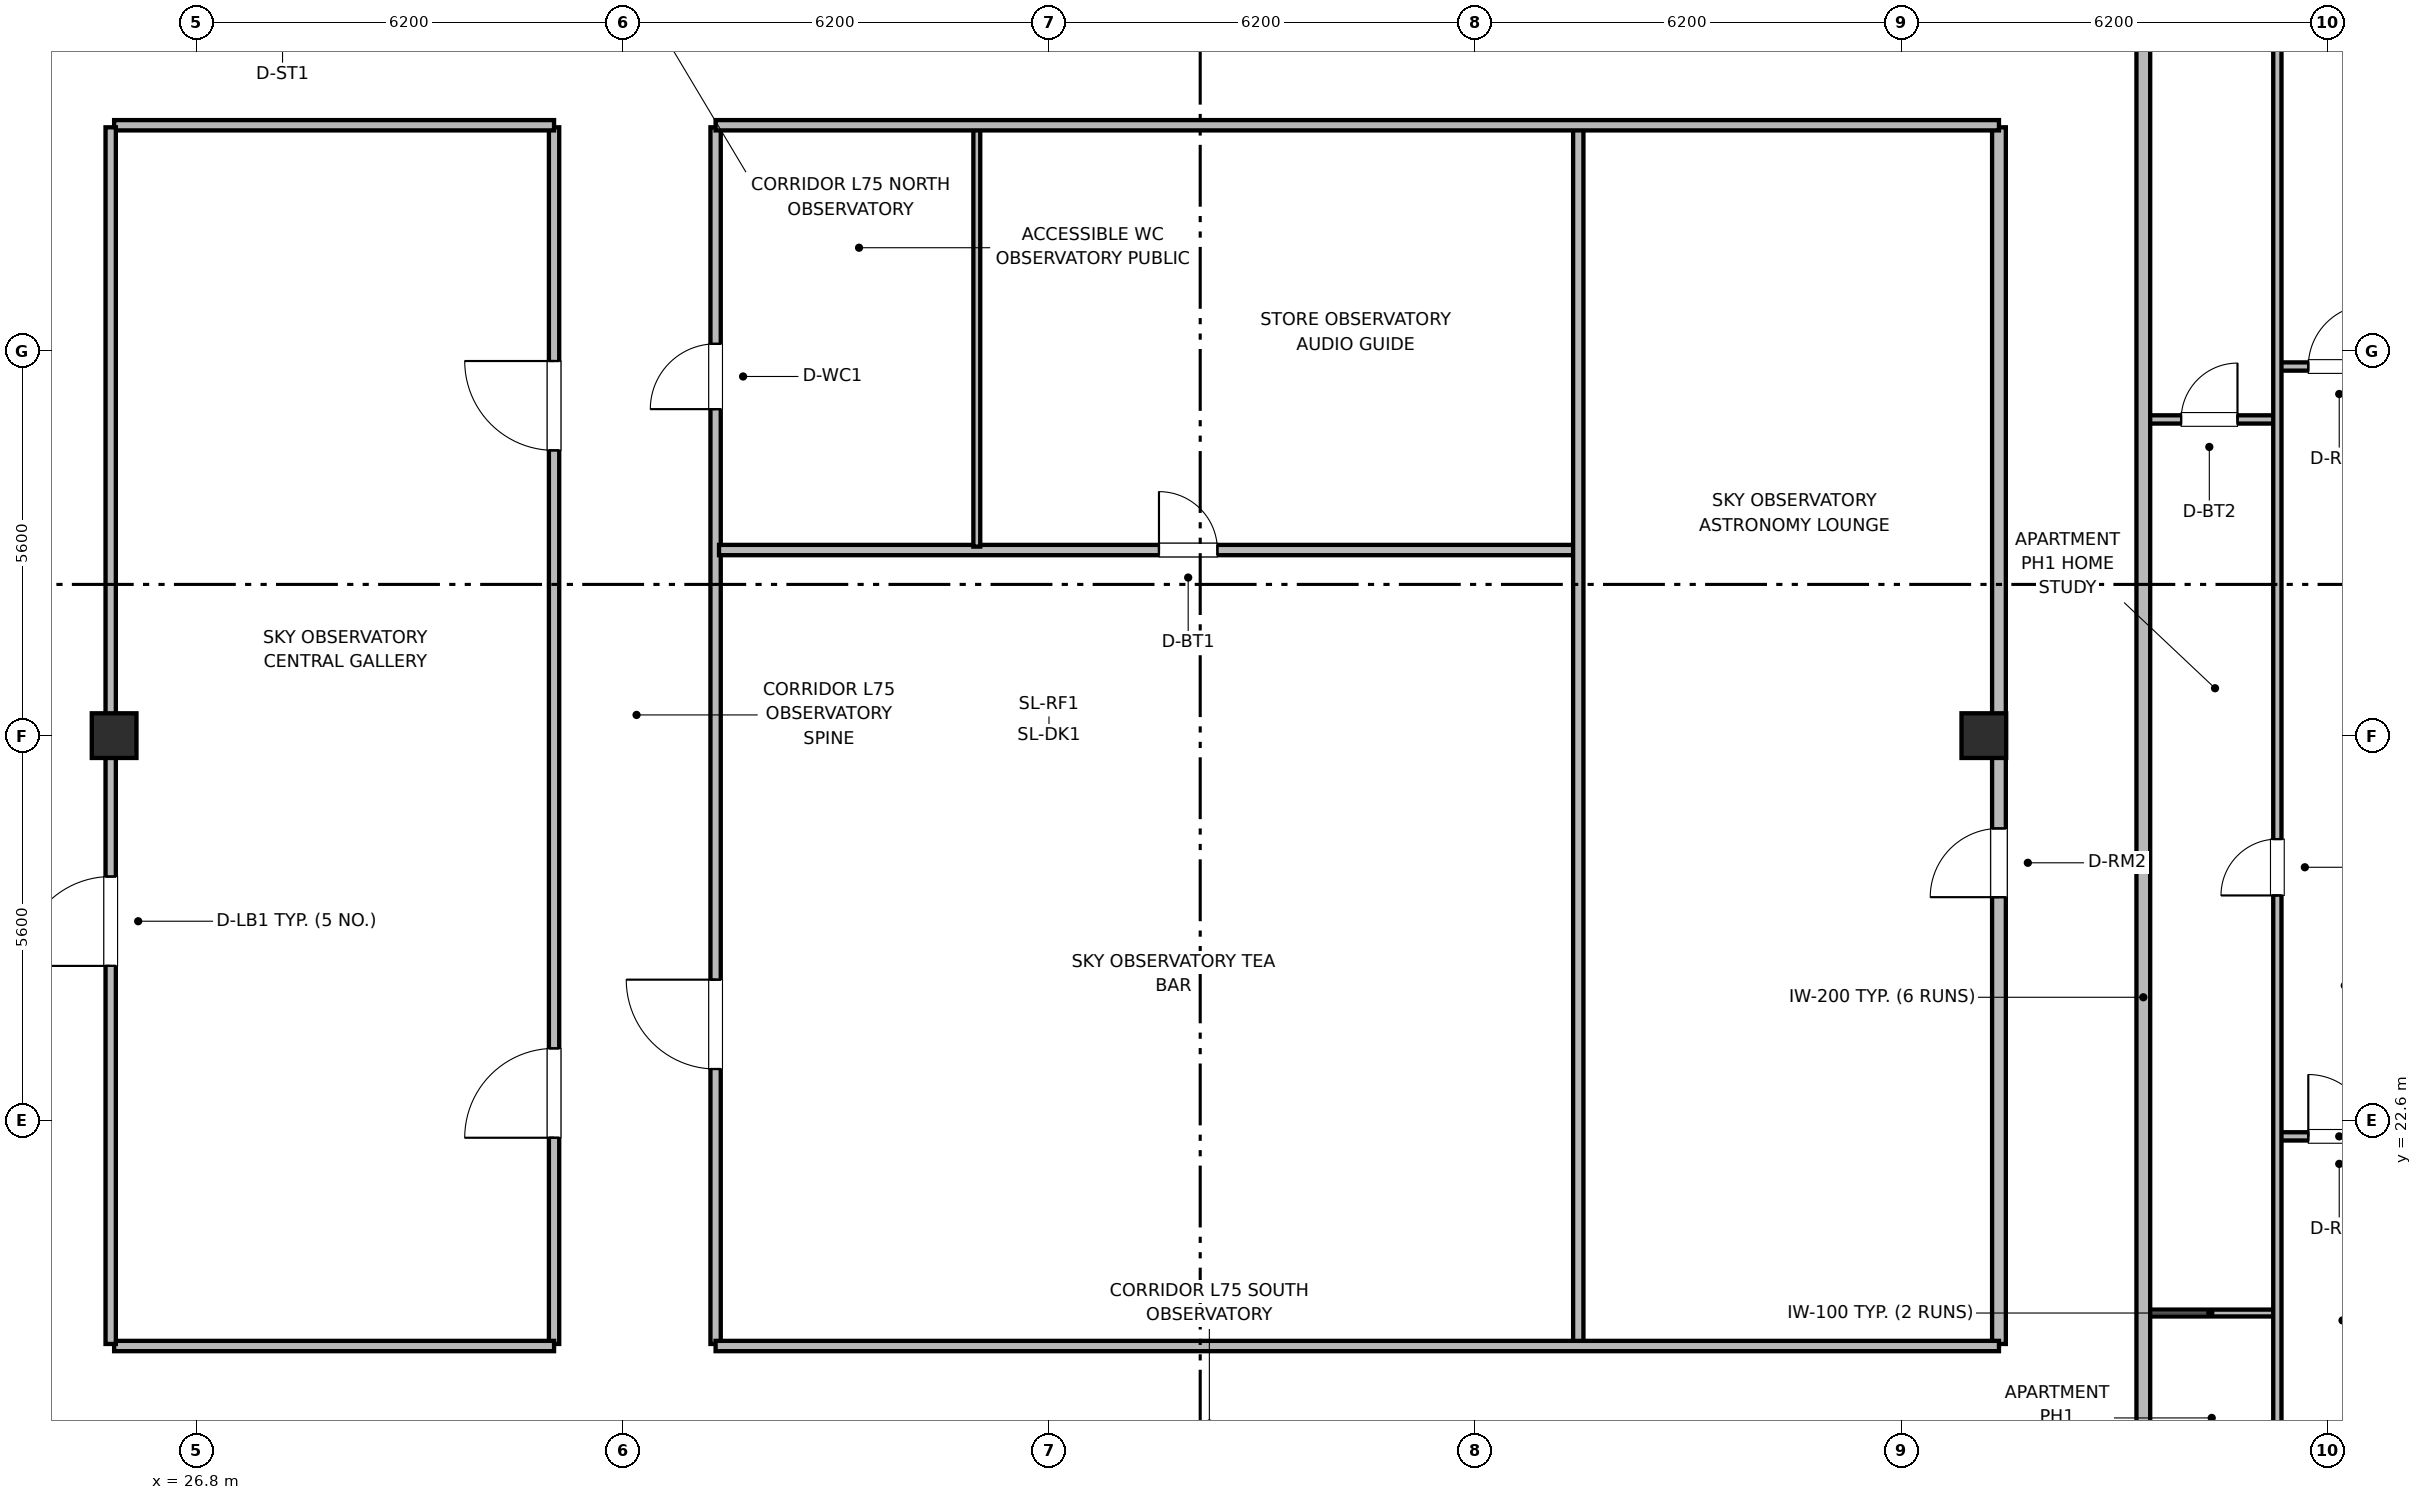
"""IFC4 building model, lengths in metres.
Left out: names, types, materials, properties, quantities, classifications, styles, units other than length and angle.
Written with IfcOpenShell. Run it as: python <this file> out.ifc"""

import sys

from ifc_helpers import new_model, si_unit, direction, frame, frame_2d, origin, origin_2d, place, context, subcontext, project, spatial, rectangle, extrude, element, fill, save


model = new_model("IFC4")
c1 = context("Model", 3, precision=1e-05, world=origin(), true_north=direction((0.0, 1.0)))
c2 = subcontext(c1, "Body", "Model", "MODEL_VIEW")
j1 = project(units=[si_unit("LENGTHUNIT", "METRE"), si_unit("PLANEANGLEUNIT", "RADIAN")], contexts=[c1])
p1 = place(None, origin())
s1 = spatial("IfcSite", under=j1, at=p1, CompositionType="ELEMENT")
p2 = place(p1, origin())
s2 = spatial("IfcBuilding", under=s1, at=p2, CompositionType="ELEMENT")
p3 = place(p2, frame((0.0, 0.0, 297.2)))
s3 = spatial("IfcBuildingStorey", under=s2, at=p3, CompositionType="ELEMENT", Elevation=297.2)
for number, where, z_axis, x_axis in (
    (1, (25.6, 28.2, 0.0), (0.0, 0.0, 1.0), (1.0, 0.0, 0.0)),
    (2, (52.8, 28.2, 0.0), (0.0, 0.0, 1.0), (1.0, 0.0, 0.0)),
):
    element("IfcColumn", number, at=place(p3, frame(where, z_axis=z_axis, x_axis=x_axis)), inside=s3, PredefinedType="COLUMN", context=c2, shape_type="SweptSolid", body=[
        extrude(rectangle(XDim=0.65, YDim=0.65, at=origin_2d()), origin(), (0.0, 0.0, 1.0), 4.8),
    ])
p4 = place(p3, frame((32.0, 19.35, 0.0), z_axis=(0.0, 0.0, 1.0), x_axis=(0.0, 1.0, 0.0)))
e3 = element("IfcWall", 3, at=p4, inside=s3, PredefinedType="PARTITIONING", context=c2, shape_type="SweptSolid", body=[
    extrude(rectangle(XDim=17.7, YDim=0.15, at=frame_2d((8.85, 0.0))), origin(), (0.0, 0.0, 1.0), 2.56),
])
p5 = place(p4, frame((3.0, 0.0, 0.0)))
e4 = element("IfcOpeningElement", 4, at=p5, cuts=e3, PredefinedType="OPENING", context=c2, shape_type="SweptSolid", body=[
    extrude(rectangle(XDim=1.3, YDim=2.2, at=frame_2d((0.65, 1.1))), frame((0.0, 0.085, 0.0), z_axis=(0.0, -1.0, 0.0), x_axis=(1.0, 0.0, 0.0)), (0.0, 0.0, 1.0), 0.17),
])
p6 = place(p4, frame((13.0, 0.0, 0.0)))
e5 = element("IfcOpeningElement", 5, at=p6, cuts=e3, PredefinedType="OPENING", context=c2, shape_type="SweptSolid", body=[
    extrude(rectangle(XDim=1.3, YDim=2.2, at=frame_2d((0.65, 1.1))), frame((0.0, 0.085, 0.0), z_axis=(0.0, -1.0, 0.0), x_axis=(1.0, 0.0, 0.0)), (0.0, 0.0, 1.0), 0.17),
])
for number, where, z_axis, x_axis in (
    (6, (25.6, 19.32, 0.0), (0.0, 0.0, 1.0), (1.0, 0.0, 0.0)),
    (7, (25.6, 37.08, 0.0), (0.0, 0.0, 1.0), (1.0, 0.0, 0.0)),
):
    element("IfcWall", number, at=place(p3, frame(where, z_axis=z_axis, x_axis=x_axis)), inside=s3, PredefinedType="PARTITIONING", context=c2, shape_type="SweptSolid", body=[
        extrude(rectangle(XDim=6.4, YDim=0.15, at=frame_2d((3.2, 0.0))), origin(), (0.0, 0.0, 1.0), 2.56),
    ])
p7 = place(p3, frame((25.55, 19.35, 0.0), z_axis=(0.0, 0.0, 1.0), x_axis=(0.0, 1.0, 0.0)))
e8 = element("IfcWall", 8, at=p7, inside=s3, PredefinedType="PARTITIONING", context=c2, shape_type="SweptSolid", body=[
    extrude(rectangle(XDim=17.7, YDim=0.15, at=frame_2d((8.85, 0.0))), origin(), (0.0, 0.0, 1.0), 2.56),
])
p8 = place(p7, frame((5.5, 0.0, 0.0)))
e9 = element("IfcOpeningElement", 9, at=p8, cuts=e8, PredefinedType="OPENING", context=c2, shape_type="SweptSolid", body=[
    extrude(rectangle(XDim=1.3, YDim=2.2, at=frame_2d((0.65, 1.1))), frame((0.0, 0.085, 0.0), z_axis=(0.0, -1.0, 0.0), x_axis=(1.0, 0.0, 0.0)), (0.0, 0.0, 1.0), 0.17),
])
p9 = place(p3, frame((34.35, 19.35, 0.0), z_axis=(0.0, 0.0, 1.0), x_axis=(0.0, 1.0, 0.0)))
e10 = element("IfcWall", 10, at=p9, inside=s3, PredefinedType="PARTITIONING", context=c2, shape_type="SweptSolid", body=[
    extrude(rectangle(XDim=17.7, YDim=0.15, at=frame_2d((8.85, 0.0))), origin(), (0.0, 0.0, 1.0), 2.56),
])
p10 = place(p9, frame((4.0, 0.0, 0.0)))
e11 = element("IfcOpeningElement", 11, at=p10, cuts=e10, PredefinedType="OPENING", context=c2, shape_type="SweptSolid", body=[
    extrude(rectangle(XDim=1.3, YDim=2.2, at=frame_2d((0.65, 1.1))), frame((0.0, 0.085, 0.0), z_axis=(0.0, -1.0, 0.0), x_axis=(1.0, 0.0, 0.0)), (0.0, 0.0, 1.0), 0.17),
])
p11 = place(p9, frame((13.6, 0.0, 0.0)))
e12 = element("IfcOpeningElement", 12, at=p11, cuts=e10, PredefinedType="OPENING", context=c2, shape_type="SweptSolid", body=[
    extrude(rectangle(XDim=0.95, YDim=2.1, at=frame_2d((0.475, 1.05))), frame((0.0, 0.085, 0.0), z_axis=(0.0, -1.0, 0.0), x_axis=(1.0, 0.0, 0.0)), (0.0, 0.0, 1.0), 0.17),
])
p12 = place(p3, frame((34.4, 30.9, 0.0), z_axis=(0.0, 0.0, 1.0), x_axis=(1.0, 0.0, 0.0)))
e13 = element("IfcWall", 13, at=p12, inside=s3, PredefinedType="PARTITIONING", context=c2, shape_type="SweptSolid", body=[
    extrude(rectangle(XDim=12.45, YDim=0.15, at=frame_2d((6.225, 0.0))), origin(), (0.0, 0.0, 1.0), 2.56),
])
p13 = place(p12, frame((6.4, 0.0, 0.0)))
e14 = element("IfcOpeningElement", 14, at=p13, cuts=e13, PredefinedType="OPENING", context=c2, shape_type="SweptSolid", body=[
    extrude(rectangle(XDim=0.85, YDim=2.1, at=frame_2d((0.425, 1.05))), frame((0.0, 0.085, 0.0), z_axis=(0.0, -1.0, 0.0), x_axis=(1.0, 0.0, 0.0)), (0.0, 0.0, 1.0), 0.17),
])
p14 = place(p3, frame((38.15, 30.95, 0.0), z_axis=(0.0, 0.0, 1.0), x_axis=(0.0, 1.0, 0.0)))
e15 = element("IfcWall", 15, at=p14, inside=s3, PredefinedType="PARTITIONING", context=c2, shape_type="SweptSolid", body=[
    extrude(rectangle(XDim=6.07, YDim=0.1, at=frame_2d((3.035, 0.0))), origin(), (0.0, 0.0, 1.0), 2.56),
])
p15 = place(p3, frame((46.9, 19.35, 0.0), z_axis=(0.0, 0.0, 1.0), x_axis=(0.0, 1.0, 0.0)))
e16 = element("IfcWall", 16, at=p15, inside=s3, PredefinedType="PARTITIONING", context=c2, shape_type="SweptSolid", body=[
    extrude(rectangle(XDim=17.7, YDim=0.15, at=frame_2d((8.85, 0.0))), origin(), (0.0, 0.0, 1.0), 2.56),
])
p16 = place(p3, frame((53.02, 19.35, 0.0), z_axis=(0.0, 0.0, 1.0), x_axis=(0.0, 1.0, 0.0)))
e17 = element("IfcWall", 17, at=p16, inside=s3, PredefinedType="PARTITIONING", context=c2, shape_type="SweptSolid", body=[
    extrude(rectangle(XDim=17.7, YDim=0.2, at=frame_2d((8.85, 0.0))), origin(), (0.0, 0.0, 1.0), 2.56),
])
p17 = place(p16, frame((6.5, 0.0, 0.0)))
e18 = element("IfcOpeningElement", 18, at=p17, cuts=e17, PredefinedType="OPENING", context=c2, shape_type="SweptSolid", body=[
    extrude(rectangle(XDim=1.0, YDim=2.15, at=frame_2d((0.5, 1.075))), frame((0.0, 0.11, 0.0), z_axis=(0.0, -1.0, 0.0), x_axis=(1.0, 0.0, 0.0)), (0.0, 0.0, 1.0), 0.22),
])
for number, where, z_axis, x_axis in (
    (19, (34.35, 19.32, 0.0), (0.0, 0.0, 1.0), (1.0, 0.0, 0.0)),
    (20, (34.35, 37.08, 0.0), (0.0, 0.0, 1.0), (1.0, 0.0, 0.0)),
):
    element("IfcWall", number, at=place(p3, frame(where, z_axis=z_axis, x_axis=x_axis)), inside=s3, PredefinedType="PARTITIONING", context=c2, shape_type="SweptSolid", body=[
        extrude(rectangle(XDim=18.67, YDim=0.15, at=frame_2d((9.335, 0.0))), origin(), (0.0, 0.0, 1.0), 2.56),
    ])
p18 = place(p3, frame((55.12, 19.8, 0.0), z_axis=(0.0, 0.0, 1.0), x_axis=(1.0, 0.0, 0.0)))
e21 = element("IfcWall", 21, at=p18, inside=s3, PredefinedType="PARTITIONING", context=c2, shape_type="SweptSolid", body=[
    extrude(rectangle(XDim=1.95, YDim=0.1, at=frame_2d((0.975, 0.0))), origin(), (0.0, 0.0, 1.0), 2.56),
])
p19 = place(p3, frame((55.12, 32.8, 0.0), z_axis=(0.0, 0.0, 1.0), x_axis=(1.0, 0.0, 0.0)))
e22 = element("IfcWall", 22, at=p19, inside=s3, PredefinedType="PARTITIONING", context=c2, shape_type="SweptSolid", body=[
    extrude(rectangle(XDim=1.95, YDim=0.12, at=frame_2d((0.975, 0.0))), origin(), (0.0, 0.0, 1.0), 2.56),
])
p20 = place(p19, frame((0.55, 0.0, 0.0)))
e23 = element("IfcOpeningElement", 23, at=p20, cuts=e22, PredefinedType="OPENING", context=c2, shape_type="SweptSolid", body=[
    extrude(rectangle(XDim=0.82, YDim=2.08, at=frame_2d((0.41, 1.04))), frame((0.0, 0.07, 0.0), z_axis=(0.0, -1.0, 0.0), x_axis=(1.0, 0.0, 0.0)), (0.0, 0.0, 1.0), 0.14),
])
p21 = place(p3, frame((57.07, 22.37, 0.0), z_axis=(0.0, 0.0, 1.0), x_axis=(1.0, 0.0, 0.0)))
e24 = element("IfcWall", 24, at=p21, inside=s3, PredefinedType="PARTITIONING", context=c2, shape_type="SweptSolid", body=[
    extrude(rectangle(XDim=1.8, YDim=0.12, at=frame_2d((0.9, 0.0))), origin(), (0.0, 0.0, 1.0), 2.56),
])
p22 = place(p21, frame((0.45, 0.0, 0.0)))
e25 = element("IfcOpeningElement", 25, at=p22, cuts=e24, PredefinedType="OPENING", context=c2, shape_type="SweptSolid", body=[
    extrude(rectangle(XDim=0.9, YDim=2.1, at=frame_2d((0.45, 1.05))), frame((0.0, 0.07, 0.0), z_axis=(0.0, -1.0, 0.0), x_axis=(1.0, 0.0, 0.0)), (0.0, 0.0, 1.0), 0.14),
])
p23 = place(p3, frame((57.07, 33.57, 0.0), z_axis=(0.0, 0.0, 1.0), x_axis=(1.0, 0.0, 0.0)))
e26 = element("IfcWall", 26, at=p23, inside=s3, PredefinedType="PARTITIONING", context=c2, shape_type="SweptSolid", body=[
    extrude(rectangle(XDim=1.8, YDim=0.12, at=frame_2d((0.9, 0.0))), origin(), (0.0, 0.0, 1.0), 2.56),
])
p24 = place(p23, frame((0.45, 0.0, 0.0)))
e27 = element("IfcOpeningElement", 27, at=p24, cuts=e26, PredefinedType="OPENING", context=c2, shape_type="SweptSolid", body=[
    extrude(rectangle(XDim=0.9, YDim=2.1, at=frame_2d((0.45, 1.05))), frame((0.0, 0.07, 0.0), z_axis=(0.0, -1.0, 0.0), x_axis=(1.0, 0.0, 0.0)), (0.0, 0.0, 1.0), 0.14),
])
p25 = place(p3, frame((57.07, 10.64, 0.0), z_axis=(0.0, 0.0, 1.0), x_axis=(0.0, 1.0, 0.0)))
e28 = element("IfcWall", 28, at=p25, inside=s3, PredefinedType="PARTITIONING", context=c2, shape_type="SweptSolid", body=[
    extrude(rectangle(XDim=35.12, YDim=0.12, at=frame_2d((17.56, 0.0))), origin(), (0.0, 0.0, 1.0), 2.56),
])
p26 = place(p25, frame((1.36, 0.0, 0.0)))
e29 = element("IfcOpeningElement", 29, at=p26, cuts=e28, PredefinedType="OPENING", context=c2, shape_type="SweptSolid", body=[
    extrude(rectangle(XDim=0.9, YDim=2.1, at=frame_2d((0.45, 1.05))), frame((0.0, 0.07, 0.0), z_axis=(0.0, -1.0, 0.0), x_axis=(1.0, 0.0, 0.0)), (0.0, 0.0, 1.0), 0.14),
])
p27 = place(p25, frame((15.235, 0.0, 0.0)))
e30 = element("IfcOpeningElement", 30, at=p27, cuts=e28, PredefinedType="OPENING", context=c2, shape_type="SweptSolid", body=[
    extrude(rectangle(XDim=0.82, YDim=2.08, at=frame_2d((0.41, 1.04))), frame((0.0, 0.07, 0.0), z_axis=(0.0, -1.0, 0.0), x_axis=(1.0, 0.0, 0.0)), (0.0, 0.0, 1.0), 0.14),
])
p28 = place(p3, frame((55.12, 10.5, 0.0), z_axis=(0.0, 0.0, 1.0), x_axis=(0.0, 1.0, 0.0)))
e31 = element("IfcWall", 31, at=p28, inside=s3, PredefinedType="PARTITIONING", context=c2, shape_type="SweptSolid", body=[
    extrude(rectangle(XDim=35.4, YDim=0.2, at=frame_2d((17.7, 0.0))), origin(), (0.0, 0.0, 1.0), 2.56),
])
p29 = place(p28, frame((2.75, 0.0, 0.0)))
e32 = element("IfcOpeningElement", 32, at=p29, cuts=e31, PredefinedType="OPENING", context=c2, shape_type="SweptSolid", body=[
    extrude(rectangle(XDim=1.0, YDim=2.15, at=frame_2d((0.5, 1.075))), frame((0.0, 0.11, 0.0), z_axis=(0.0, -1.0, 0.0), x_axis=(1.0, 0.0, 0.0)), (0.0, 0.0, 1.0), 0.22),
])
p30 = place(p5, origin())
e33 = element("IfcDoor", 33, at=p30, inside=s3, OperationType="SINGLE_SWING_LEFT", PredefinedType="DOOR", context=c2, shape_type="SweptSolid", body=[
    extrude(rectangle(XDim=1.3, YDim=2.2, at=frame_2d((0.65, 1.1))), frame((0.0, 0.025, 0.0), z_axis=(0.0, -1.0, 0.0), x_axis=(1.0, 0.0, 0.0)), (0.0, 0.0, 1.0), 0.05),
])
fill(e4, e33)
p31 = place(p6, origin())
e34 = element("IfcDoor", 34, at=p31, inside=s3, OperationType="SINGLE_SWING_RIGHT", PredefinedType="DOOR", context=c2, shape_type="SweptSolid", body=[
    extrude(rectangle(XDim=1.3, YDim=2.2, at=frame_2d((0.65, 1.1))), frame((0.0, 0.025, 0.0), z_axis=(0.0, -1.0, 0.0), x_axis=(1.0, 0.0, 0.0)), (0.0, 0.0, 1.0), 0.05),
])
fill(e5, e34)
p32 = place(p8, origin())
e35 = element("IfcDoor", 35, at=p32, inside=s3, OperationType="SINGLE_SWING_LEFT", PredefinedType="DOOR", context=c2, shape_type="SweptSolid", body=[
    extrude(rectangle(XDim=1.3, YDim=2.2, at=frame_2d((0.65, 1.1))), frame((0.0, 0.025, 0.0), z_axis=(0.0, -1.0, 0.0), x_axis=(1.0, 0.0, 0.0)), (0.0, 0.0, 1.0), 0.05),
])
fill(e9, e35)
p33 = place(p10, origin())
e36 = element("IfcDoor", 36, at=p33, inside=s3, OperationType="SINGLE_SWING_RIGHT", PredefinedType="DOOR", context=c2, shape_type="SweptSolid", body=[
    extrude(rectangle(XDim=1.3, YDim=2.2, at=frame_2d((0.65, 1.1))), frame((0.0, 0.025, 0.0), z_axis=(0.0, -1.0, 0.0), x_axis=(1.0, 0.0, 0.0)), (0.0, 0.0, 1.0), 0.05),
])
fill(e11, e36)
p34 = place(p11, origin())
e37 = element("IfcDoor", 37, at=p34, inside=s3, OperationType="SINGLE_SWING_LEFT", PredefinedType="DOOR", context=c2, shape_type="SweptSolid", body=[
    extrude(rectangle(XDim=0.95, YDim=2.1, at=frame_2d((0.475, 1.05))), frame((0.0, 0.025, 0.0), z_axis=(0.0, -1.0, 0.0), x_axis=(1.0, 0.0, 0.0)), (0.0, 0.0, 1.0), 0.05),
])
fill(e12, e37)
p35 = place(p13, origin())
e38 = element("IfcDoor", 38, at=p35, inside=s3, OperationType="SINGLE_SWING_LEFT", PredefinedType="DOOR", context=c2, shape_type="SweptSolid", body=[
    extrude(rectangle(XDim=0.85, YDim=2.1, at=frame_2d((0.425, 1.05))), frame((0.0, 0.025, 0.0), z_axis=(0.0, -1.0, 0.0), x_axis=(1.0, 0.0, 0.0)), (0.0, 0.0, 1.0), 0.05),
])
fill(e14, e38)
p36 = place(p17, origin())
e39 = element("IfcDoor", 39, at=p36, inside=s3, OperationType="SINGLE_SWING_LEFT", PredefinedType="DOOR", context=c2, shape_type="SweptSolid", body=[
    extrude(rectangle(XDim=1.0, YDim=2.15, at=frame_2d((0.5, 1.075))), frame((0.0, 0.025, 0.0), z_axis=(0.0, -1.0, 0.0), x_axis=(1.0, 0.0, 0.0)), (0.0, 0.0, 1.0), 0.05),
])
fill(e18, e39)
p37 = place(p20, origin())
e40 = element("IfcDoor", 40, at=p37, inside=s3, OperationType="SINGLE_SWING_RIGHT", PredefinedType="DOOR", context=c2, shape_type="SweptSolid", body=[
    extrude(rectangle(XDim=0.82, YDim=2.08, at=frame_2d((0.41, 1.04))), frame((0.0, 0.025, 0.0), z_axis=(0.0, -1.0, 0.0), x_axis=(1.0, 0.0, 0.0)), (0.0, 0.0, 1.0), 0.05),
])
fill(e23, e40)
p38 = place(p22, origin())
e41 = element("IfcDoor", 41, at=p38, inside=s3, OperationType="SINGLE_SWING_LEFT", PredefinedType="DOOR", context=c2, shape_type="SweptSolid", body=[
    extrude(rectangle(XDim=0.9, YDim=2.1, at=frame_2d((0.45, 1.05))), frame((0.0, 0.025, 0.0), z_axis=(0.0, -1.0, 0.0), x_axis=(1.0, 0.0, 0.0)), (0.0, 0.0, 1.0), 0.05),
])
fill(e25, e41)
p39 = place(p24, origin())
e42 = element("IfcDoor", 42, at=p39, inside=s3, OperationType="SINGLE_SWING_RIGHT", PredefinedType="DOOR", context=c2, shape_type="SweptSolid", body=[
    extrude(rectangle(XDim=0.9, YDim=2.1, at=frame_2d((0.45, 1.05))), frame((0.0, 0.025, 0.0), z_axis=(0.0, -1.0, 0.0), x_axis=(1.0, 0.0, 0.0)), (0.0, 0.0, 1.0), 0.05),
])
fill(e27, e42)
p40 = place(p27, origin())
e43 = element("IfcDoor", 43, at=p40, inside=s3, OperationType="SINGLE_SWING_LEFT", PredefinedType="DOOR", context=c2, shape_type="SweptSolid", body=[
    extrude(rectangle(XDim=0.82, YDim=2.08, at=frame_2d((0.41, 1.04))), frame((0.0, 0.025, 0.0), z_axis=(0.0, -1.0, 0.0), x_axis=(1.0, 0.0, 0.0)), (0.0, 0.0, 1.0), 0.05),
])
fill(e30, e43)
save(model, sys.argv[1])
